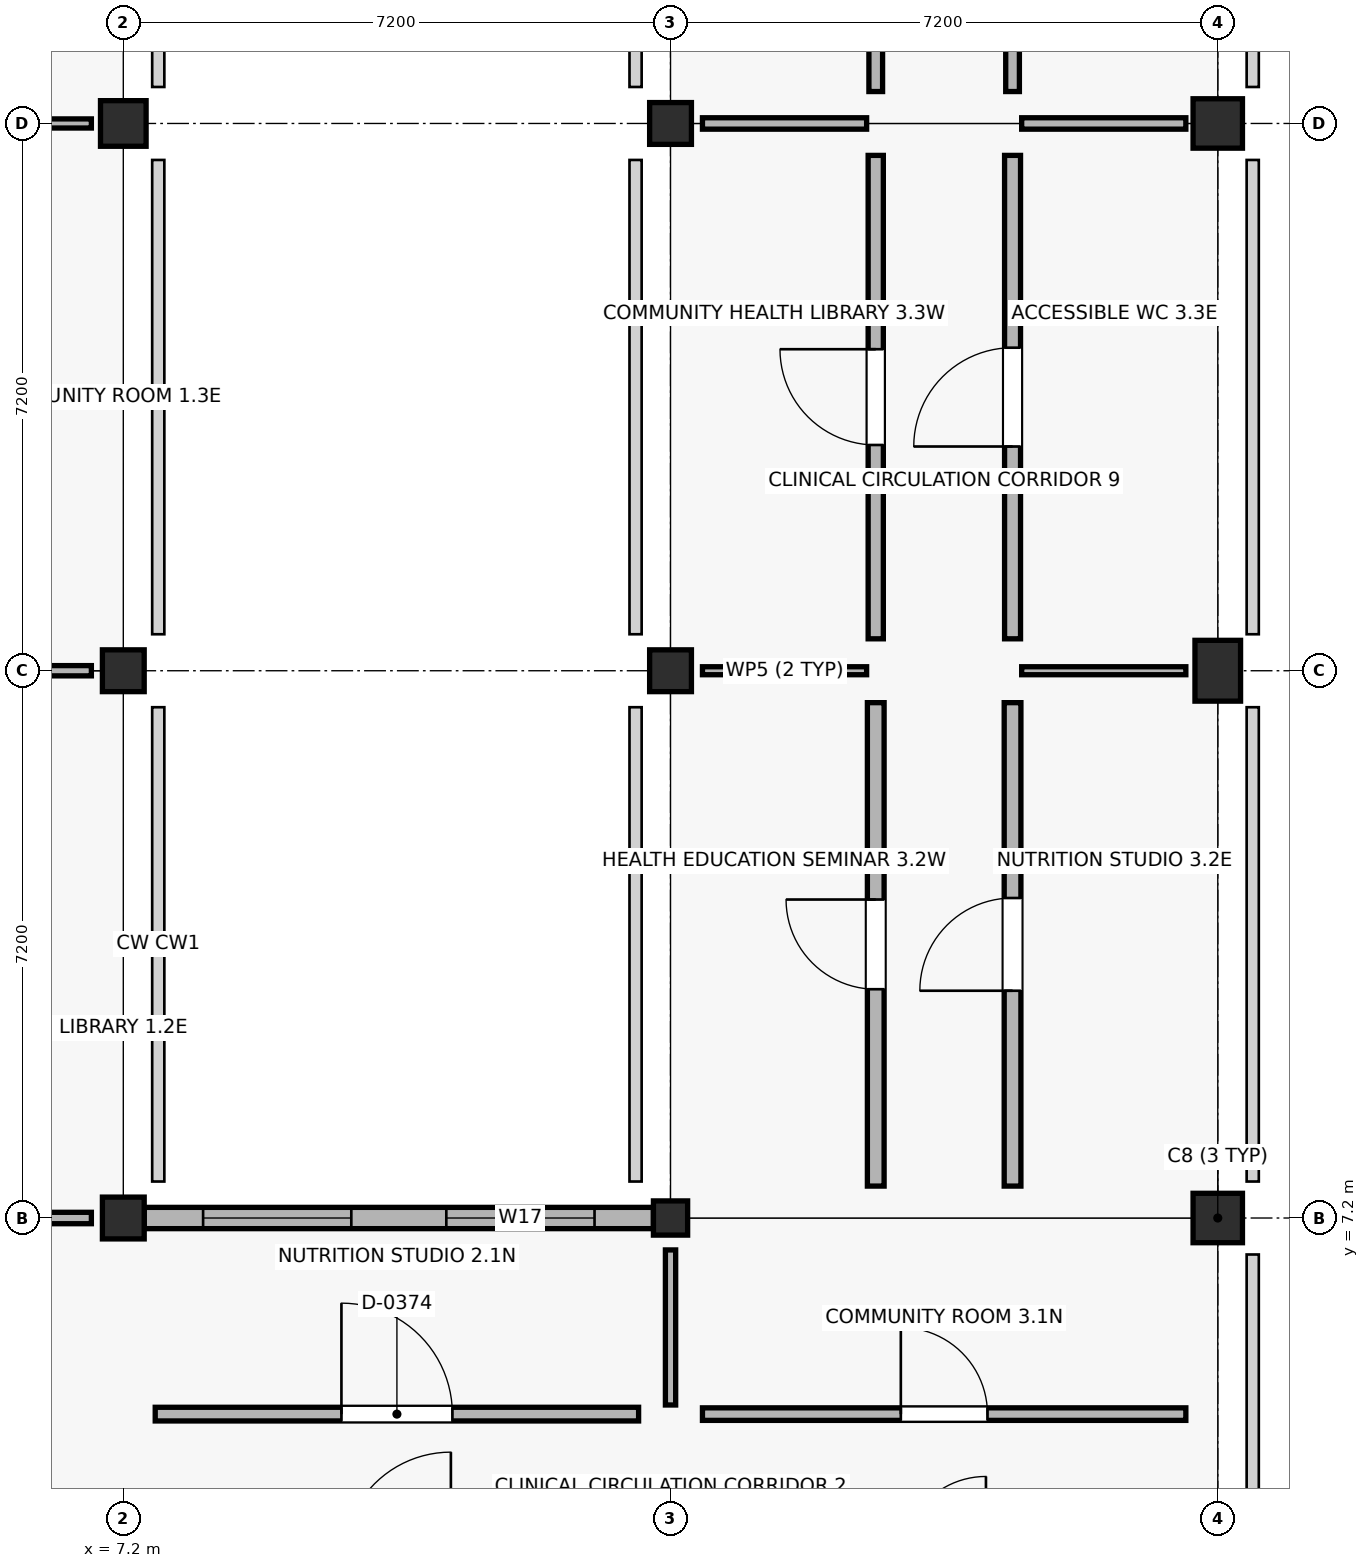
"""IFC4 building model, lengths in metres.
Left out: names, types, materials, properties, quantities, classifications, styles, units other than length and angle.
Written with IfcOpenShell. Run it as: python <this file> out.ifc"""

import sys

from ifc_helpers import new_model, si_unit, direction, frame, frame_2d, origin, origin_2d, place, context, subcontext, project, spatial, rectangle, circle, extrude, element, fill, save


model = new_model("IFC4")
c1 = context("Model", 3, precision=1e-05, world=origin(), true_north=direction((0.0, 1.0)))
c2 = subcontext(c1, "Body", "Model", "MODEL_VIEW")
j1 = project(units=[si_unit("LENGTHUNIT", "METRE"), si_unit("PLANEANGLEUNIT", "RADIAN")], contexts=[c1])
p1 = place(None, origin())
s1 = spatial("IfcSite", under=j1, at=p1, CompositionType="ELEMENT")
p2 = place(p1, origin())
s2 = spatial("IfcBuilding", under=s1, at=p2, CompositionType="ELEMENT")
p3 = place(p2, frame((0.0, 0.0, 4.5)))
s3 = spatial("IfcBuildingStorey", under=s2, at=p3, CompositionType="ELEMENT", Elevation=4.5)
for number, where, z_axis, x_axis in (
    (1, (7.2, 7.2, 0.0), (0.0, 0.0, 1.0), (1.0, 0.0, 0.0)),
    (2, (7.2, 14.4, 0.0), (0.0, 0.0, 1.0), (1.0, 0.0, 0.0)),
):
    element("IfcColumn", number, at=place(p3, frame(where, z_axis=z_axis, x_axis=x_axis)), inside=s3, PredefinedType="COLUMN", context=c2, shape_type="SweptSolid", body=[
        extrude(rectangle(XDim=0.55, YDim=0.55, at=origin_2d()), origin(), (0.0, 0.0, 1.0), 4.5),
    ])
p4 = place(p3, frame((7.2, 21.6, 0.0), z_axis=(0.0, 0.0, 1.0), x_axis=(1.0, 0.0, 0.0)))
e3 = element("IfcColumn", 3, at=p4, inside=s3, PredefinedType="COLUMN", context=c2, shape_type="SweptSolid", body=[
    extrude(rectangle(XDim=0.6, YDim=0.6, at=origin_2d()), origin(), (0.0, 0.0, 1.0), 4.5),
])
p5 = place(p3, frame((14.4, 7.2, 0.0), z_axis=(0.0, 0.0, 1.0), x_axis=(1.0, 0.0, 0.0)))
e4 = element("IfcColumn", 4, at=p5, inside=s3, PredefinedType="COLUMN", context=c2, shape_type="SweptSolid", body=[
    extrude(rectangle(XDim=0.45, YDim=0.45, at=origin_2d()), origin(), (0.0, 0.0, 1.0), 4.28),
])
for number, where, z_axis, x_axis in (
    (5, (14.4, 14.4, 0.0), (0.0, 0.0, 1.0), (1.0, 0.0, 0.0)),
    (6, (14.4, 21.6, 0.0), (0.0, 0.0, 1.0), (1.0, 0.0, 0.0)),
):
    element("IfcColumn", number, at=place(p3, frame(where, z_axis=z_axis, x_axis=x_axis)), inside=s3, PredefinedType="COLUMN", context=c2, shape_type="SweptSolid", body=[
        extrude(rectangle(XDim=0.55, YDim=0.55, at=origin_2d()), origin(), (0.0, 0.0, 1.0), 4.5),
    ])
p6 = place(p3, frame((21.6, 7.2, 0.0), z_axis=(0.0, 0.0, 1.0), x_axis=(1.0, 0.0, 0.0)))
e7 = element("IfcColumn", 7, at=p6, inside=s3, PredefinedType="COLUMN", context=c2, shape_type="SweptSolid", body=[
    extrude(circle(Radius=0.325, at=origin_2d()), origin(), (0.0, 0.0, 1.0), 4.28),
])
p7 = place(p3, frame((21.6, 14.4, 0.0), z_axis=(0.0, 0.0, 1.0), x_axis=(1.0, 0.0, 0.0)))
e8 = element("IfcColumn", 8, at=p7, inside=s3, PredefinedType="PILASTER", context=c2, shape_type="SweptSolid", body=[
    extrude(rectangle(XDim=0.6, YDim=0.8, at=origin_2d()), origin(), (0.0, 0.0, 1.0), 4.5),
])
p8 = place(p3, frame((21.6, 21.6, 0.0), z_axis=(0.0, 0.0, 1.0), x_axis=(1.0, 0.0, 0.0)))
e9 = element("IfcColumn", 9, at=p8, inside=s3, PredefinedType="COLUMN", context=c2, shape_type="SweptSolid", body=[
    extrude(circle(Radius=0.325, at=origin_2d()), origin(), (0.0, 0.0, 1.0), 4.5),
])
p9 = place(p3, frame((14.175, 7.2, 0.0), z_axis=(0.0, 0.0, 1.0), x_axis=(-1.0, 0.0, 0.0)))
e10 = element("IfcWall", 10, at=p9, inside=s3, PredefinedType="STANDARD", context=c2, shape_type="SweptSolid", body=[
    extrude(rectangle(XDim=6.7, YDim=0.28, at=frame_2d((3.35, 0.0))), origin(), (0.0, 0.0, 1.0), 3.47),
])
p10 = place(p9, frame((0.775, 0.0, 0.9)))
e11 = element("IfcOpeningElement", 11, at=p10, cuts=e10, PredefinedType="OPENING", context=c2, shape_type="SweptSolid", body=[
    extrude(rectangle(XDim=1.95, YDim=1.38, at=frame_2d((0.975, 0.69))), frame((0.0, 0.15, 0.0), z_axis=(0.0, -1.0, 0.0), x_axis=(1.0, 0.0, 0.0)), (0.0, 0.0, 1.0), 0.3),
])
p11 = place(p9, frame((3.975, 0.0, 0.9)))
e12 = element("IfcOpeningElement", 12, at=p11, cuts=e10, PredefinedType="OPENING", context=c2, shape_type="SweptSolid", body=[
    extrude(rectangle(XDim=1.95, YDim=1.38, at=frame_2d((0.975, 0.69))), frame((0.0, 0.15, 0.0), z_axis=(0.0, -1.0, 0.0), x_axis=(1.0, 0.0, 0.0)), (0.0, 0.0, 1.0), 0.3),
])
p12 = place(p3, frame((4.62, 7.2, 0.0), z_axis=(0.0, 0.0, 1.0), x_axis=(1.0, 0.0, 0.0)))
e13 = element("IfcWall", 13, at=p12, inside=s3, PredefinedType="PARTITIONING", context=c2, shape_type="SweptSolid", body=[
    extrude(rectangle(XDim=2.16, YDim=0.15, at=frame_2d((1.08, 0.0))), origin(), (0.0, 0.0, 1.0), 3.36),
])
p13 = place(p3, frame((4.62, 14.4, 0.0), z_axis=(0.0, 0.0, 1.0), x_axis=(1.0, 0.0, 0.0)))
e14 = element("IfcWall", 14, at=p13, inside=s3, PredefinedType="PARTITIONING", context=c2, shape_type="SweptSolid", body=[
    extrude(rectangle(XDim=2.16, YDim=0.135, at=frame_2d((1.08, 0.0))), origin(), (0.0, 0.0, 1.0), 3.36),
])
p14 = place(p3, frame((4.62, 21.6, 0.0), z_axis=(0.0, 0.0, 1.0), x_axis=(1.0, 0.0, 0.0)))
e15 = element("IfcWall", 15, at=p14, inside=s3, PredefinedType="PARTITIONING", context=c2, shape_type="SweptSolid", body=[
    extrude(rectangle(XDim=2.16, YDim=0.12, at=frame_2d((1.08, 0.0))), origin(), (0.0, 0.0, 1.0), 3.36),
])
p15 = place(p3, frame((7.62, 4.62, 0.0), z_axis=(0.0, 0.0, 1.0), x_axis=(1.0, 0.0, 0.0)))
e16 = element("IfcWall", 16, at=p15, inside=s3, PredefinedType="PARTITIONING", context=c2, shape_type="SweptSolid", body=[
    extrude(rectangle(XDim=6.36, YDim=0.18, at=frame_2d((3.18, 0.0))), origin(), (0.0, 0.0, 1.0), 3.36),
])
p16 = place(p15, frame((2.45, 0.0, 0.0)))
e17 = element("IfcOpeningElement", 17, at=p16, cuts=e16, PredefinedType="OPENING", context=c2, shape_type="SweptSolid", body=[
    extrude(rectangle(XDim=1.46, YDim=2.04, at=frame_2d((0.73, 1.02))), frame((0.0, 0.1, 0.0), z_axis=(0.0, -1.0, 0.0), x_axis=(1.0, 0.0, 0.0)), (0.0, 0.0, 1.0), 0.2),
])
p17 = place(p3, frame((14.4, 4.74, 0.0), z_axis=(0.0, 0.0, 1.0), x_axis=(0.0, 1.0, 0.0)))
e18 = element("IfcWall", 18, at=p17, inside=s3, PredefinedType="PARTITIONING", context=c2, shape_type="SweptSolid", body=[
    extrude(rectangle(XDim=2.04, YDim=0.135, at=frame_2d((1.02, 0.0))), origin(), (0.0, 0.0, 1.0), 3.36),
])
p18 = place(p3, frame((14.82, 4.62, 0.0), z_axis=(0.0, 0.0, 1.0), x_axis=(1.0, 0.0, 0.0)))
e19 = element("IfcWall", 19, at=p18, inside=s3, PredefinedType="PARTITIONING", context=c2, shape_type="SweptSolid", body=[
    extrude(rectangle(XDim=6.36, YDim=0.165, at=frame_2d((3.18, 0.0))), origin(), (0.0, 0.0, 1.0), 3.36),
])
p19 = place(p18, frame((2.61, 0.0, 0.0)))
e20 = element("IfcOpeningElement", 20, at=p19, cuts=e19, PredefinedType="OPENING", context=c2, shape_type="SweptSolid", body=[
    extrude(rectangle(XDim=1.14, YDim=2.09, at=frame_2d((0.57, 1.045))), frame((0.0, 0.093, 0.0), z_axis=(0.0, -1.0, 0.0), x_axis=(1.0, 0.0, 0.0)), (0.0, 0.0, 1.0), 0.185),
])
p20 = place(p3, frame((17.1, 7.62, 0.0), z_axis=(0.0, 0.0, 1.0), x_axis=(0.0, 1.0, 0.0)))
e21 = element("IfcWall", 21, at=p20, inside=s3, PredefinedType="SOLIDWALL", context=c2, shape_type="SweptSolid", body=[
    extrude(rectangle(XDim=6.36, YDim=0.22, at=frame_2d((3.18, 0.0))), origin(), (0.0, 0.0, 1.0), 3.36),
])
p21 = place(p20, frame((2.59, 0.0, 0.0)))
e22 = element("IfcOpeningElement", 22, at=p21, cuts=e21, PredefinedType="OPENING", context=c2, shape_type="SweptSolid", body=[
    extrude(rectangle(XDim=1.18, YDim=2.09, at=frame_2d((0.59, 1.045))), frame((0.0, 0.12, 0.0), z_axis=(0.0, -1.0, 0.0), x_axis=(1.0, 0.0, 0.0)), (0.0, 0.0, 1.0), 0.24),
])
p22 = place(p3, frame((14.82, 14.4, 0.0), z_axis=(0.0, 0.0, 1.0), x_axis=(1.0, 0.0, 0.0)))
e23 = element("IfcWall", 23, at=p22, inside=s3, PredefinedType="PARTITIONING", context=c2, shape_type="SweptSolid", body=[
    extrude(rectangle(XDim=2.16, YDim=0.105, at=frame_2d((1.08, 0.0))), origin(), (0.0, 0.0, 1.0), 3.36),
])
p23 = place(p3, frame((18.9, 7.62, 0.0), z_axis=(0.0, 0.0, 1.0), x_axis=(0.0, 1.0, 0.0)))
e24 = element("IfcWall", 24, at=p23, inside=s3, PredefinedType="SOLIDWALL", context=c2, shape_type="SweptSolid", body=[
    extrude(rectangle(XDim=6.36, YDim=0.22, at=frame_2d((3.18, 0.0))), origin(), (0.0, 0.0, 1.0), 3.36),
])
p24 = place(p23, frame((2.57, 0.0, 0.0)))
e25 = element("IfcOpeningElement", 25, at=p24, cuts=e24, PredefinedType="OPENING", context=c2, shape_type="SweptSolid", body=[
    extrude(rectangle(XDim=1.22, YDim=2.09, at=frame_2d((0.61, 1.045))), frame((0.0, 0.12, 0.0), z_axis=(0.0, -1.0, 0.0), x_axis=(1.0, 0.0, 0.0)), (0.0, 0.0, 1.0), 0.24),
])
p25 = place(p3, frame((19.02, 14.4, 0.0), z_axis=(0.0, 0.0, 1.0), x_axis=(1.0, 0.0, 0.0)))
e26 = element("IfcWall", 26, at=p25, inside=s3, PredefinedType="PARTITIONING", context=c2, shape_type="SweptSolid", body=[
    extrude(rectangle(XDim=2.16, YDim=0.105, at=frame_2d((1.08, 0.0))), origin(), (0.0, 0.0, 1.0), 3.36),
])
p26 = place(p3, frame((17.1, 14.82, 0.0), z_axis=(0.0, 0.0, 1.0), x_axis=(0.0, 1.0, 0.0)))
e27 = element("IfcWall", 27, at=p26, inside=s3, PredefinedType="SOLIDWALL", context=c2, shape_type="SweptSolid", body=[
    extrude(rectangle(XDim=6.36, YDim=0.2, at=frame_2d((3.18, 0.0))), origin(), (0.0, 0.0, 1.0), 3.36),
])
p27 = place(p26, frame((2.55, 0.0, 0.0)))
e28 = element("IfcOpeningElement", 28, at=p27, cuts=e27, PredefinedType="OPENING", context=c2, shape_type="SweptSolid", body=[
    extrude(rectangle(XDim=1.26, YDim=2.09, at=frame_2d((0.63, 1.045))), frame((0.0, 0.11, 0.0), z_axis=(0.0, -1.0, 0.0), x_axis=(1.0, 0.0, 0.0)), (0.0, 0.0, 1.0), 0.22),
])
p28 = place(p3, frame((14.82, 21.6, 0.0), z_axis=(0.0, 0.0, 1.0), x_axis=(1.0, 0.0, 0.0)))
e29 = element("IfcWall", 29, at=p28, inside=s3, PredefinedType="PARTITIONING", context=c2, shape_type="SweptSolid", body=[
    extrude(rectangle(XDim=2.16, YDim=0.15, at=frame_2d((1.08, 0.0))), origin(), (0.0, 0.0, 1.0), 3.36),
])
p29 = place(p3, frame((18.9, 14.82, 0.0), z_axis=(0.0, 0.0, 1.0), x_axis=(0.0, 1.0, 0.0)))
e30 = element("IfcWall", 30, at=p29, inside=s3, PredefinedType="PLUMBINGWALL", context=c2, shape_type="SweptSolid", body=[
    extrude(rectangle(XDim=6.36, YDim=0.21, at=frame_2d((3.18, 0.0))), origin(), (0.0, 0.0, 1.0), 3.36),
])
p30 = place(p29, frame((2.53, 0.0, 0.0)))
e31 = element("IfcOpeningElement", 31, at=p30, cuts=e30, PredefinedType="OPENING", context=c2, shape_type="SweptSolid", body=[
    extrude(rectangle(XDim=1.3, YDim=2.09, at=frame_2d((0.65, 1.045))), frame((0.0, 0.115, 0.0), z_axis=(0.0, -1.0, 0.0), x_axis=(1.0, 0.0, 0.0)), (0.0, 0.0, 1.0), 0.23),
])
p31 = place(p3, frame((19.02, 21.6, 0.0), z_axis=(0.0, 0.0, 1.0), x_axis=(1.0, 0.0, 0.0)))
e32 = element("IfcWall", 32, at=p31, inside=s3, PredefinedType="PARTITIONING", context=c2, shape_type="SweptSolid", body=[
    extrude(rectangle(XDim=2.16, YDim=0.15, at=frame_2d((1.08, 0.0))), origin(), (0.0, 0.0, 1.0), 3.36),
])
p32 = place(p3, frame((17.1, 22.02, 0.0), z_axis=(0.0, 0.0, 1.0), x_axis=(0.0, 1.0, 0.0)))
e33 = element("IfcWall", 33, at=p32, inside=s3, PredefinedType="PARTITIONING", context=c2, shape_type="SweptSolid", body=[
    extrude(rectangle(XDim=6.36, YDim=0.18, at=frame_2d((3.18, 0.0))), origin(), (0.0, 0.0, 1.0), 3.36),
])
p33 = place(p32, frame((2.51, 0.0, 0.0)))
e34 = element("IfcOpeningElement", 34, at=p33, cuts=e33, PredefinedType="OPENING", context=c2, shape_type="SweptSolid", body=[
    extrude(rectangle(XDim=1.34, YDim=2.09, at=frame_2d((0.67, 1.045))), frame((0.0, 0.1, 0.0), z_axis=(0.0, -1.0, 0.0), x_axis=(1.0, 0.0, 0.0)), (0.0, 0.0, 1.0), 0.2),
])
p34 = place(p3, frame((18.9, 22.02, 0.0), z_axis=(0.0, 0.0, 1.0), x_axis=(0.0, 1.0, 0.0)))
e35 = element("IfcWall", 35, at=p34, inside=s3, PredefinedType="PARTITIONING", context=c2, shape_type="SweptSolid", body=[
    extrude(rectangle(XDim=6.36, YDim=0.18, at=frame_2d((3.18, 0.0))), origin(), (0.0, 0.0, 1.0), 3.36),
])
p35 = place(p34, frame((2.49, 0.0, 0.0)))
e36 = element("IfcOpeningElement", 36, at=p35, cuts=e35, PredefinedType="OPENING", context=c2, shape_type="SweptSolid", body=[
    extrude(rectangle(XDim=1.38, YDim=2.09, at=frame_2d((0.69, 1.045))), frame((0.0, 0.1, 0.0), z_axis=(0.0, -1.0, 0.0), x_axis=(1.0, 0.0, 0.0)), (0.0, 0.0, 1.0), 0.2),
])
p36 = place(p10, origin())
e37 = element("IfcWindow", 37, at=p36, inside=s3, PartitioningType="SINGLE_PANEL", PredefinedType="WINDOW", context=c2, shape_type="SweptSolid", body=[
    extrude(rectangle(XDim=1.95, YDim=1.38, at=frame_2d((0.975, 0.69))), frame((0.0, 0.03, 0.0), z_axis=(0.0, -1.0, 0.0), x_axis=(1.0, 0.0, 0.0)), (0.0, 0.0, 1.0), 0.06),
])
fill(e11, e37)
p37 = place(p11, origin())
e38 = element("IfcWindow", 38, at=p37, inside=s3, PartitioningType="SINGLE_PANEL", PredefinedType="WINDOW", context=c2, shape_type="SweptSolid", body=[
    extrude(rectangle(XDim=1.95, YDim=1.38, at=frame_2d((0.975, 0.69))), frame((0.0, 0.03, 0.0), z_axis=(0.0, -1.0, 0.0), x_axis=(1.0, 0.0, 0.0)), (0.0, 0.0, 1.0), 0.06),
])
fill(e12, e38)
p38 = place(p16, origin())
e39 = element("IfcDoor", 39, at=p38, inside=s3, OperationType="SINGLE_SWING_LEFT", PredefinedType="DOOR", context=c2, shape_type="SweptSolid", body=[
    extrude(rectangle(XDim=1.46, YDim=2.04, at=frame_2d((0.73, 1.02))), frame((0.0, 0.025, 0.0), z_axis=(0.0, -1.0, 0.0), x_axis=(1.0, 0.0, 0.0)), (0.0, 0.0, 1.0), 0.05),
])
fill(e17, e39)
p39 = place(p19, origin())
e40 = element("IfcDoor", 40, at=p39, inside=s3, OperationType="SINGLE_SWING_LEFT", PredefinedType="DOOR", context=c2, shape_type="SweptSolid", body=[
    extrude(rectangle(XDim=1.14, YDim=2.09, at=frame_2d((0.57, 1.045))), frame((0.0, 0.025, 0.0), z_axis=(0.0, -1.0, 0.0), x_axis=(1.0, 0.0, 0.0)), (0.0, 0.0, 1.0), 0.05),
])
fill(e20, e40)
p40 = place(p21, origin())
e41 = element("IfcDoor", 41, at=p40, inside=s3, OperationType="SINGLE_SWING_RIGHT", PredefinedType="DOOR", context=c2, shape_type="SweptSolid", body=[
    extrude(rectangle(XDim=1.18, YDim=2.09, at=frame_2d((0.59, 1.045))), frame((0.0, 0.025, 0.0), z_axis=(0.0, -1.0, 0.0), x_axis=(1.0, 0.0, 0.0)), (0.0, 0.0, 1.0), 0.05),
])
fill(e22, e41)
p41 = place(p24, origin())
e42 = element("IfcDoor", 42, at=p41, inside=s3, OperationType="SINGLE_SWING_LEFT", PredefinedType="DOOR", context=c2, shape_type="SweptSolid", body=[
    extrude(rectangle(XDim=1.22, YDim=2.09, at=frame_2d((0.61, 1.045))), frame((0.0, 0.025, 0.0), z_axis=(0.0, -1.0, 0.0), x_axis=(1.0, 0.0, 0.0)), (0.0, 0.0, 1.0), 0.05),
])
fill(e25, e42)
p42 = place(p27, origin())
e43 = element("IfcDoor", 43, at=p42, inside=s3, OperationType="SINGLE_SWING_RIGHT", PredefinedType="DOOR", context=c2, shape_type="SweptSolid", body=[
    extrude(rectangle(XDim=1.26, YDim=2.09, at=frame_2d((0.63, 1.045))), frame((0.0, 0.025, 0.0), z_axis=(0.0, -1.0, 0.0), x_axis=(1.0, 0.0, 0.0)), (0.0, 0.0, 1.0), 0.05),
])
fill(e28, e43)
p43 = place(p30, origin())
e44 = element("IfcDoor", 44, at=p43, inside=s3, OperationType="SINGLE_SWING_LEFT", PredefinedType="DOOR", context=c2, shape_type="SweptSolid", body=[
    extrude(rectangle(XDim=1.3, YDim=2.09, at=frame_2d((0.65, 1.045))), frame((0.0, 0.025, 0.0), z_axis=(0.0, -1.0, 0.0), x_axis=(1.0, 0.0, 0.0)), (0.0, 0.0, 1.0), 0.05),
])
fill(e31, e44)
save(model, sys.argv[1])
